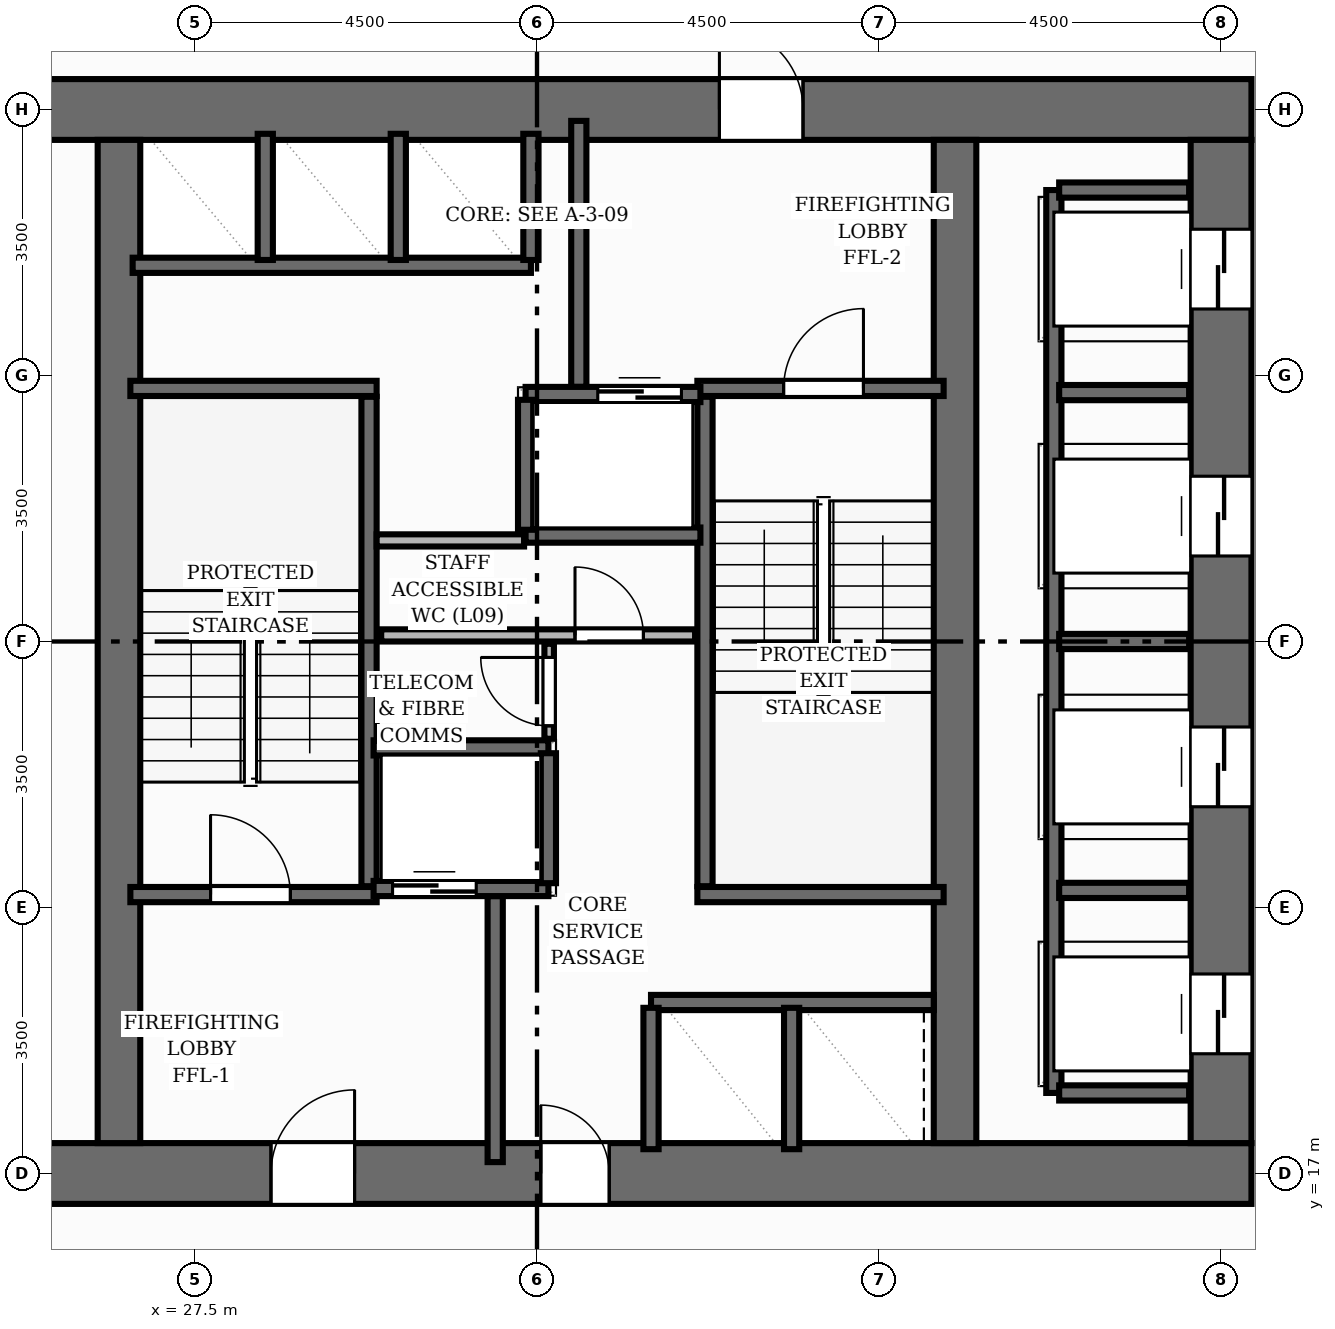
"""IFC4 building model, lengths in metres.
Left out: names, types, materials, properties, quantities, classifications, styles, units other than length and angle.
Written with IfcOpenShell. Run it as: python <this file> out.ifc"""

import sys

from ifc_helpers import new_model, si_unit, direction, frame, frame_2d, origin, place, context, subcontext, project, spatial, rectangle, extrude, element, fill, save


model = new_model("IFC4")
c1 = context("Model", 3, precision=1e-05, world=origin(), true_north=direction((0.0, 1.0)))
c2 = subcontext(c1, "Body", "Model", "MODEL_VIEW")
j1 = project(units=[si_unit("LENGTHUNIT", "METRE"), si_unit("PLANEANGLEUNIT", "RADIAN")], contexts=[c1])
p1 = place(None, origin())
s1 = spatial("IfcSite", under=j1, at=p1, CompositionType="ELEMENT")
p2 = place(p1, origin())
s2 = spatial("IfcBuilding", under=s1, at=p2, CompositionType="ELEMENT")
p3 = place(p2, frame((0.0, 0.0, 34.4)))
s3 = spatial("IfcBuildingStorey", under=s2, at=p3, CompositionType="ELEMENT", Elevation=34.4)
p4 = place(p3, frame((22.6, 17.0, 0.0), z_axis=(0.0, 0.0, 1.0), x_axis=(1.0, 0.0, 0.0)))
e1 = element("IfcWall", 1, at=p4, inside=s3, PredefinedType="SHEAR", context=c2, shape_type="SweptSolid", body=[
    extrude(rectangle(XDim=18.8, YDim=0.8, at=frame_2d((9.4, 0.0))), origin(), (0.0, 0.0, 1.0), 3.2),
])
p5 = place(p4, frame((5.9, 0.0, 0.0)))
e2 = element("IfcOpeningElement", 2, at=p5, cuts=e1, PredefinedType="OPENING", context=c2, shape_type="SweptSolid", body=[
    extrude(rectangle(XDim=1.1, YDim=2.15, at=frame_2d((0.55, 1.075))), frame((0.0, 0.41, 0.0), z_axis=(0.0, -1.0, 0.0), x_axis=(1.0, 0.0, 0.0)), (0.0, 0.0, 1.0), 0.82),
])
p6 = place(p4, frame((9.45, 0.0, 0.0)))
e3 = element("IfcOpeningElement", 3, at=p6, cuts=e1, PredefinedType="OPENING", context=c2, shape_type="SweptSolid", body=[
    extrude(rectangle(XDim=0.9, YDim=2.1, at=frame_2d((0.45, 1.05))), frame((0.0, 0.41, 0.0), z_axis=(0.0, -1.0, 0.0), x_axis=(1.0, 0.0, 0.0)), (0.0, 0.0, 1.0), 0.82),
])
p7 = place(p3, frame((22.6, 31.0, 0.0), z_axis=(0.0, 0.0, 1.0), x_axis=(1.0, 0.0, 0.0)))
e4 = element("IfcWall", 4, at=p7, inside=s3, PredefinedType="SHEAR", context=c2, shape_type="SweptSolid", body=[
    extrude(rectangle(XDim=18.8, YDim=0.8, at=frame_2d((9.4, 0.0))), origin(), (0.0, 0.0, 1.0), 3.2),
])
p8 = place(p7, frame((11.8, 0.0, 0.0)))
e5 = element("IfcOpeningElement", 5, at=p8, cuts=e4, PredefinedType="OPENING", context=c2, shape_type="SweptSolid", body=[
    extrude(rectangle(XDim=1.1, YDim=2.15, at=frame_2d((0.55, 1.075))), frame((0.0, 0.41, 0.0), z_axis=(0.0, -1.0, 0.0), x_axis=(1.0, 0.0, 0.0)), (0.0, 0.0, 1.0), 0.82),
])
p9 = place(p3, frame((41.0, 17.4, 0.0), z_axis=(0.0, 0.0, 1.0), x_axis=(0.0, 1.0, 0.0)))
e6 = element("IfcWall", 6, at=p9, inside=s3, PredefinedType="SHEAR", context=c2, shape_type="SweptSolid", body=[
    extrude(rectangle(XDim=13.2, YDim=0.8, at=frame_2d((6.6, 0.0))), origin(), (0.0, 0.0, 1.0), 3.2),
])
p10 = place(p9, frame((1.175, 0.0, 0.0)))
e7 = element("IfcOpeningElement", 7, at=p10, cuts=e6, PredefinedType="OPENING", context=c2, shape_type="SweptSolid", body=[
    extrude(rectangle(XDim=1.05, YDim=2.15, at=frame_2d((0.525, 1.075))), frame((0.0, 0.41, 0.0), z_axis=(0.0, -1.0, 0.0), x_axis=(1.0, 0.0, 0.0)), (0.0, 0.0, 1.0), 0.82),
])
p11 = place(p9, frame((4.425, 0.0, 0.0)))
e8 = element("IfcOpeningElement", 8, at=p11, cuts=e6, PredefinedType="OPENING", context=c2, shape_type="SweptSolid", body=[
    extrude(rectangle(XDim=1.05, YDim=2.15, at=frame_2d((0.525, 1.075))), frame((0.0, 0.41, 0.0), z_axis=(0.0, -1.0, 0.0), x_axis=(1.0, 0.0, 0.0)), (0.0, 0.0, 1.0), 0.82),
])
p12 = place(p9, frame((7.725, 0.0, 0.0)))
e9 = element("IfcOpeningElement", 9, at=p12, cuts=e6, PredefinedType="OPENING", context=c2, shape_type="SweptSolid", body=[
    extrude(rectangle(XDim=1.05, YDim=2.15, at=frame_2d((0.525, 1.075))), frame((0.0, 0.41, 0.0), z_axis=(0.0, -1.0, 0.0), x_axis=(1.0, 0.0, 0.0)), (0.0, 0.0, 1.0), 0.82),
])
p13 = place(p9, frame((10.975, 0.0, 0.0)))
e10 = element("IfcOpeningElement", 10, at=p13, cuts=e6, PredefinedType="OPENING", context=c2, shape_type="SweptSolid", body=[
    extrude(rectangle(XDim=1.05, YDim=2.15, at=frame_2d((0.525, 1.075))), frame((0.0, 0.41, 0.0), z_axis=(0.0, -1.0, 0.0), x_axis=(1.0, 0.0, 0.0)), (0.0, 0.0, 1.0), 0.82),
])
for number, where, z_axis, x_axis in (
    (11, (26.5, 17.4, 0.0), (0.0, 0.0, 1.0), (0.0, 1.0, 0.0)),
    (12, (37.5, 17.4, 0.0), (0.0, 0.0, 1.0), (0.0, 1.0, 0.0)),
):
    element("IfcWall", number, at=place(p3, frame(where, z_axis=z_axis, x_axis=x_axis)), inside=s3, PredefinedType="SHEAR", context=c2, shape_type="SweptSolid", body=[
        extrude(rectangle(XDim=13.2, YDim=0.56, at=frame_2d((6.6, 0.0))), origin(), (0.0, 0.0, 1.0), 3.2),
    ])
p14 = place(p3, frame((29.79, 20.78, 0.0), z_axis=(0.0, 0.0, 1.0), x_axis=(0.0, 1.0, 0.0)))
e13 = element("IfcWall", 13, at=p14, inside=s3, PredefinedType="SHEAR", context=c2, shape_type="SweptSolid", body=[
    extrude(rectangle(XDim=6.44, YDim=0.2, at=frame_2d((3.22, 0.0))), origin(), (0.0, 0.0, 1.0), 3.2),
])
p15 = place(p3, frame((26.65, 27.33, 0.0), z_axis=(0.0, 0.0, 1.0), x_axis=(1.0, 0.0, 0.0)))
e14 = element("IfcWall", 14, at=p15, inside=s3, PredefinedType="SHEAR", context=c2, shape_type="SweptSolid", body=[
    extrude(rectangle(XDim=3.24, YDim=0.2, at=frame_2d((1.62, 0.0))), origin(), (0.0, 0.0, 1.0), 3.2),
])
p16 = place(p3, frame((26.65, 20.67, 0.0), z_axis=(0.0, 0.0, 1.0), x_axis=(1.0, 0.0, 0.0)))
e15 = element("IfcWall", 15, at=p16, inside=s3, PredefinedType="SHEAR", context=c2, shape_type="SweptSolid", body=[
    extrude(rectangle(XDim=3.24, YDim=0.2, at=frame_2d((1.62, 0.0))), origin(), (0.0, 0.0, 1.0), 3.2),
])
p17 = place(p16, frame((1.055, 0.0, 0.0)))
e16 = element("IfcOpeningElement", 16, at=p17, cuts=e15, PredefinedType="OPENING", context=c2, shape_type="SweptSolid", body=[
    extrude(rectangle(XDim=1.05, YDim=2.15, at=frame_2d((0.525, 1.075))), frame((0.0, 0.11, 0.0), z_axis=(0.0, -1.0, 0.0), x_axis=(1.0, 0.0, 0.0)), (0.0, 0.0, 1.0), 0.22),
])
p18 = place(p3, frame((34.21, 20.78, 0.0), z_axis=(0.0, 0.0, 1.0), x_axis=(0.0, 1.0, 0.0)))
e17 = element("IfcWall", 17, at=p18, inside=s3, PredefinedType="SHEAR", context=c2, shape_type="SweptSolid", body=[
    extrude(rectangle(XDim=6.44, YDim=0.2, at=frame_2d((3.22, 0.0))), origin(), (0.0, 0.0, 1.0), 3.2),
])
p19 = place(p3, frame((34.11, 20.67, 0.0), z_axis=(0.0, 0.0, 1.0), x_axis=(1.0, 0.0, 0.0)))
e18 = element("IfcWall", 18, at=p19, inside=s3, PredefinedType="SHEAR", context=c2, shape_type="SweptSolid", body=[
    extrude(rectangle(XDim=3.24, YDim=0.2, at=frame_2d((1.62, 0.0))), origin(), (0.0, 0.0, 1.0), 3.2),
])
p20 = place(p3, frame((34.11, 27.33, 0.0), z_axis=(0.0, 0.0, 1.0), x_axis=(1.0, 0.0, 0.0)))
e19 = element("IfcWall", 19, at=p20, inside=s3, PredefinedType="SHEAR", context=c2, shape_type="SweptSolid", body=[
    extrude(rectangle(XDim=3.24, YDim=0.2, at=frame_2d((1.62, 0.0))), origin(), (0.0, 0.0, 1.0), 3.2),
])
p21 = place(p20, frame((1.135, 0.0, 0.0)))
e20 = element("IfcOpeningElement", 20, at=p21, cuts=e19, PredefinedType="OPENING", context=c2, shape_type="SweptSolid", body=[
    extrude(rectangle(XDim=1.05, YDim=2.15, at=frame_2d((0.525, 1.075))), frame((0.0, 0.11, 0.0), z_axis=(0.0, -1.0, 0.0), x_axis=(1.0, 0.0, 0.0)), (0.0, 0.0, 1.0), 0.22),
])
for number, where, z_axis, x_axis in (
    (21, (31.45, 17.15, 0.0), (0.0, 0.0, 1.0), (0.0, 1.0, 0.0)),
    (22, (32.55, 27.35, 0.0), (0.0, 0.0, 1.0), (0.0, 1.0, 0.0)),
):
    element("IfcWall", number, at=place(p3, frame(where, z_axis=z_axis, x_axis=x_axis)), inside=s3, PredefinedType="SHEAR", context=c2, shape_type="SweptSolid", body=[
        extrude(rectangle(XDim=3.5, YDim=0.2, at=frame_2d((1.75, 0.0))), origin(), (0.0, 0.0, 1.0), 3.2),
    ])
p22 = place(p3, frame((29.85, 20.75, 0.0), z_axis=(0.0, 0.0, 1.0), x_axis=(1.0, 0.0, 0.0)))
e23 = element("IfcWall", 23, at=p22, inside=s3, PredefinedType="SHEAR", context=c2, shape_type="SweptSolid", body=[
    extrude(rectangle(XDim=2.3, YDim=0.2, at=frame_2d((1.15, 0.0))), origin(), (0.0, 0.0, 1.0), 3.2),
])
p23 = place(p22, frame((0.25, 0.0, 0.0)))
e24 = element("IfcOpeningElement", 24, at=p23, cuts=e23, PredefinedType="OPENING", context=c2, shape_type="SweptSolid", body=[
    extrude(rectangle(XDim=1.1, YDim=2.15, at=frame_2d((0.55, 1.075))), frame((0.0, 0.11, 0.0), z_axis=(0.0, -1.0, 0.0), x_axis=(1.0, 0.0, 0.0)), (0.0, 0.0, 1.0), 0.22),
])
p24 = place(p3, frame((29.85, 22.6, 0.0), z_axis=(0.0, 0.0, 1.0), x_axis=(1.0, 0.0, 0.0)))
e25 = element("IfcWall", 25, at=p24, inside=s3, PredefinedType="SHEAR", context=c2, shape_type="SweptSolid", body=[
    extrude(rectangle(XDim=2.3, YDim=0.2, at=frame_2d((1.15, 0.0))), origin(), (0.0, 0.0, 1.0), 3.2),
])
p25 = place(p3, frame((32.15, 20.82, 0.0), z_axis=(0.0, 0.0, 1.0), x_axis=(0.0, 1.0, 0.0)))
e26 = element("IfcWall", 26, at=p25, inside=s3, PredefinedType="SHEAR", context=c2, shape_type="SweptSolid", body=[
    extrude(rectangle(XDim=1.71, YDim=0.2, at=frame_2d((0.855, 0.0))), origin(), (0.0, 0.0, 1.0), 3.2),
])
p26 = place(p3, frame((31.85, 27.25, 0.0), z_axis=(0.0, 0.0, 1.0), x_axis=(1.0, 0.0, 0.0)))
e27 = element("IfcWall", 27, at=p26, inside=s3, PredefinedType="SHEAR", context=c2, shape_type="SweptSolid", body=[
    extrude(rectangle(XDim=2.3, YDim=0.2, at=frame_2d((1.15, 0.0))), origin(), (0.0, 0.0, 1.0), 3.2),
])
p27 = place(p26, frame((0.95, 0.0, 0.0)))
e28 = element("IfcOpeningElement", 28, at=p27, cuts=e27, PredefinedType="OPENING", context=c2, shape_type="SweptSolid", body=[
    extrude(rectangle(XDim=1.1, YDim=2.15, at=frame_2d((0.55, 1.075))), frame((0.0, 0.11, 0.0), z_axis=(0.0, -1.0, 0.0), x_axis=(1.0, 0.0, 0.0)), (0.0, 0.0, 1.0), 0.22),
])
p28 = place(p3, frame((31.85, 25.4, 0.0), z_axis=(0.0, 0.0, 1.0), x_axis=(1.0, 0.0, 0.0)))
e29 = element("IfcWall", 29, at=p28, inside=s3, PredefinedType="SHEAR", context=c2, shape_type="SweptSolid", body=[
    extrude(rectangle(XDim=2.3, YDim=0.2, at=frame_2d((1.15, 0.0))), origin(), (0.0, 0.0, 1.0), 3.2),
])
p29 = place(p3, frame((31.85, 25.47, 0.0), z_axis=(0.0, 0.0, 1.0), x_axis=(0.0, 1.0, 0.0)))
e30 = element("IfcWall", 30, at=p29, inside=s3, PredefinedType="SHEAR", context=c2, shape_type="SweptSolid", body=[
    extrude(rectangle(XDim=1.71, YDim=0.2, at=frame_2d((0.855, 0.0))), origin(), (0.0, 0.0, 1.0), 3.2),
])
p30 = place(p3, frame((38.8, 18.06, 0.0), z_axis=(0.0, 0.0, 1.0), x_axis=(0.0, 1.0, 0.0)))
e31 = element("IfcWall", 31, at=p30, inside=s3, PredefinedType="SHEAR", context=c2, shape_type="SweptSolid", body=[
    extrude(rectangle(XDim=11.88, YDim=0.2, at=frame_2d((5.94, 0.0))), origin(), (0.0, 0.0, 1.0), 3.2),
])
for number, where, z_axis, x_axis in (
    (32, (38.87, 18.06, 0.0), (0.0, 0.0, 1.0), (1.0, 0.0, 0.0)),
    (33, (38.87, 29.94, 0.0), (0.0, 0.0, 1.0), (1.0, 0.0, 0.0)),
    (34, (38.87, 20.725, 0.0), (0.0, 0.0, 1.0), (1.0, 0.0, 0.0)),
    (35, (38.87, 24.0, 0.0), (0.0, 0.0, 1.0), (1.0, 0.0, 0.0)),
    (36, (38.87, 27.275, 0.0), (0.0, 0.0, 1.0), (1.0, 0.0, 0.0)),
):
    element("IfcWall", number, at=place(p3, frame(where, z_axis=z_axis, x_axis=x_axis)), inside=s3, PredefinedType="SHEAR", context=c2, shape_type="SweptSolid", body=[
        extrude(rectangle(XDim=1.71, YDim=0.2, at=frame_2d((0.855, 0.0))), origin(), (0.0, 0.0, 1.0), 3.2),
    ])
p31 = place(p3, frame((26.68, 28.95, 0.0), z_axis=(0.0, 0.0, 1.0), x_axis=(1.0, 0.0, 0.0)))
e37 = element("IfcWall", 37, at=p31, inside=s3, PredefinedType="SHEAR", context=c2, shape_type="SweptSolid", body=[
    extrude(rectangle(XDim=5.24, YDim=0.2, at=frame_2d((2.62, 0.0))), origin(), (0.0, 0.0, 1.0), 3.2),
])
for number, where, z_axis, x_axis in (
    (38, (31.92, 29.02, 0.0), (0.0, 0.0, 1.0), (0.0, 1.0, 0.0)),
    (39, (28.425, 29.02, 0.0), (0.0, 0.0, 1.0), (0.0, 1.0, 0.0)),
    (40, (30.175, 29.02, 0.0), (0.0, 0.0, 1.0), (0.0, 1.0, 0.0)),
):
    element("IfcWall", number, at=place(p3, frame(where, z_axis=z_axis, x_axis=x_axis)), inside=s3, PredefinedType="SHEAR", context=c2, shape_type="SweptSolid", body=[
        extrude(rectangle(XDim=1.66, YDim=0.2, at=frame_2d((0.83, 0.0))), origin(), (0.0, 0.0, 1.0), 3.2),
    ])
p32 = place(p3, frame((33.5, 19.25, 0.0), z_axis=(0.0, 0.0, 1.0), x_axis=(1.0, 0.0, 0.0)))
e41 = element("IfcWall", 41, at=p32, inside=s3, PredefinedType="SHEAR", context=c2, shape_type="SweptSolid", body=[
    extrude(rectangle(XDim=3.72, YDim=0.2, at=frame_2d((1.86, 0.0))), origin(), (0.0, 0.0, 1.0), 3.2),
])
for number, where, z_axis, x_axis in (
    (42, (33.5, 17.32, 0.0), (0.0, 0.0, 1.0), (0.0, 1.0, 0.0)),
    (43, (35.35, 17.32, 0.0), (0.0, 0.0, 1.0), (0.0, 1.0, 0.0)),
):
    element("IfcWall", number, at=place(p3, frame(where, z_axis=z_axis, x_axis=x_axis)), inside=s3, PredefinedType="SHEAR", context=c2, shape_type="SweptSolid", body=[
        extrude(rectangle(XDim=1.86, YDim=0.2, at=frame_2d((0.93, 0.0))), origin(), (0.0, 0.0, 1.0), 3.2),
    ])
p33 = place(p3, frame((29.95, 24.08, 0.0), z_axis=(0.0, 0.0, 1.0), x_axis=(1.0, 0.0, 0.0)))
e44 = element("IfcWall", 44, at=p33, inside=s3, PredefinedType="PLUMBINGWALL", context=c2, shape_type="SweptSolid", body=[
    extrude(rectangle(XDim=4.13, YDim=0.16, at=frame_2d((2.065, 0.0))), origin(), (0.0, 0.0, 1.0), 2.955),
])
p34 = place(p33, frame((2.55, 0.0, 0.0)))
e45 = element("IfcOpeningElement", 45, at=p34, cuts=e44, PredefinedType="OPENING", context=c2, shape_type="SweptSolid", body=[
    extrude(rectangle(XDim=0.9, YDim=2.1, at=frame_2d((0.45, 1.05))), frame((0.0, 0.09, 0.0), z_axis=(0.0, -1.0, 0.0), x_axis=(1.0, 0.0, 0.0)), (0.0, 0.0, 1.0), 0.18),
])
p35 = place(p3, frame((32.16, 22.72, 0.0), z_axis=(0.0, 0.0, 1.0), x_axis=(0.0, 1.0, 0.0)))
e46 = element("IfcWall", 46, at=p35, inside=s3, PredefinedType="PARTITIONING", context=c2, shape_type="SweptSolid", body=[
    extrude(rectangle(XDim=1.25, YDim=0.125, at=frame_2d((0.625, 0.0))), origin(), (0.0, 0.0, 1.0), 2.955),
])
p36 = place(p35, frame((0.17, 0.0, 0.0)))
e47 = element("IfcOpeningElement", 47, at=p36, cuts=e46, PredefinedType="OPENING", context=c2, shape_type="SweptSolid", body=[
    extrude(rectangle(XDim=0.9, YDim=2.1, at=frame_2d((0.45, 1.05))), frame((0.0, 0.073, 0.0), z_axis=(0.0, -1.0, 0.0), x_axis=(1.0, 0.0, 0.0)), (0.0, 0.0, 1.0), 0.145),
])
p37 = place(p3, frame((29.89, 25.33, 0.0), z_axis=(0.0, 0.0, 1.0), x_axis=(1.0, 0.0, 0.0)))
e48 = element("IfcWall", 48, at=p37, inside=s3, PredefinedType="PLUMBINGWALL", context=c2, shape_type="SweptSolid", body=[
    extrude(rectangle(XDim=1.94, YDim=0.16, at=frame_2d((0.97, 0.0))), origin(), (0.0, 0.0, 1.0), 2.955),
])
p38 = place(p17, origin())
e49 = element("IfcDoor", 49, at=p38, inside=s3, OperationType="SINGLE_SWING_LEFT", PredefinedType="DOOR", context=c2, shape_type="SweptSolid", body=[
    extrude(rectangle(XDim=1.05, YDim=2.15, at=frame_2d((0.525, 1.075))), frame((0.0, 0.025, 0.0), z_axis=(0.0, -1.0, 0.0), x_axis=(1.0, 0.0, 0.0)), (0.0, 0.0, 1.0), 0.05),
])
fill(e16, e49)
p39 = place(p21, origin())
e50 = element("IfcDoor", 50, at=p39, inside=s3, OperationType="SINGLE_SWING_RIGHT", PredefinedType="DOOR", context=c2, shape_type="SweptSolid", body=[
    extrude(rectangle(XDim=1.05, YDim=2.15, at=frame_2d((0.525, 1.075))), frame((0.0, 0.025, 0.0), z_axis=(0.0, -1.0, 0.0), x_axis=(1.0, 0.0, 0.0)), (0.0, 0.0, 1.0), 0.05),
])
fill(e20, e50)
p40 = place(p5, origin())
e51 = element("IfcDoor", 51, at=p40, inside=s3, OperationType="SINGLE_SWING_RIGHT", PredefinedType="DOOR", context=c2, shape_type="SweptSolid", body=[
    extrude(rectangle(XDim=1.1, YDim=2.15, at=frame_2d((0.55, 1.075))), frame((0.0, 0.025, 0.0), z_axis=(0.0, -1.0, 0.0), x_axis=(1.0, 0.0, 0.0)), (0.0, 0.0, 1.0), 0.05),
])
fill(e2, e51)
p41 = place(p8, origin())
e52 = element("IfcDoor", 52, at=p41, inside=s3, OperationType="SINGLE_SWING_LEFT", PredefinedType="DOOR", context=c2, shape_type="SweptSolid", body=[
    extrude(rectangle(XDim=1.1, YDim=2.15, at=frame_2d((0.55, 1.075))), frame((0.0, 0.025, 0.0), z_axis=(0.0, -1.0, 0.0), x_axis=(1.0, 0.0, 0.0)), (0.0, 0.0, 1.0), 0.05),
])
fill(e5, e52)
p42 = place(p23, origin())
e53 = element("IfcDoor", 53, at=p42, inside=s3, OperationType="DOUBLE_DOOR_SLIDING", PredefinedType="DOOR", context=c2, shape_type="SweptSolid", body=[
    extrude(rectangle(XDim=1.1, YDim=2.15, at=frame_2d((0.55, 1.075))), frame((0.0, 0.025, 0.0), z_axis=(0.0, -1.0, 0.0), x_axis=(1.0, 0.0, 0.0)), (0.0, 0.0, 1.0), 0.05),
])
fill(e24, e53)
p43 = place(p27, origin())
e54 = element("IfcDoor", 54, at=p43, inside=s3, OperationType="DOUBLE_DOOR_SLIDING", PredefinedType="DOOR", context=c2, shape_type="SweptSolid", body=[
    extrude(rectangle(XDim=1.1, YDim=2.15, at=frame_2d((0.55, 1.075))), frame((0.0, 0.025, 0.0), z_axis=(0.0, -1.0, 0.0), x_axis=(1.0, 0.0, 0.0)), (0.0, 0.0, 1.0), 0.05),
])
fill(e28, e54)
p44 = place(p10, origin())
e55 = element("IfcDoor", 55, at=p44, inside=s3, OperationType="DOUBLE_DOOR_SLIDING", PredefinedType="DOOR", context=c2, shape_type="SweptSolid", body=[
    extrude(rectangle(XDim=1.05, YDim=2.15, at=frame_2d((0.525, 1.075))), frame((0.0, 0.025, 0.0), z_axis=(0.0, -1.0, 0.0), x_axis=(1.0, 0.0, 0.0)), (0.0, 0.0, 1.0), 0.05),
])
fill(e7, e55)
p45 = place(p11, origin())
e56 = element("IfcDoor", 56, at=p45, inside=s3, OperationType="DOUBLE_DOOR_SLIDING", PredefinedType="DOOR", context=c2, shape_type="SweptSolid", body=[
    extrude(rectangle(XDim=1.05, YDim=2.15, at=frame_2d((0.525, 1.075))), frame((0.0, 0.025, 0.0), z_axis=(0.0, -1.0, 0.0), x_axis=(1.0, 0.0, 0.0)), (0.0, 0.0, 1.0), 0.05),
])
fill(e8, e56)
p46 = place(p12, origin())
e57 = element("IfcDoor", 57, at=p46, inside=s3, OperationType="DOUBLE_DOOR_SLIDING", PredefinedType="DOOR", context=c2, shape_type="SweptSolid", body=[
    extrude(rectangle(XDim=1.05, YDim=2.15, at=frame_2d((0.525, 1.075))), frame((0.0, 0.025, 0.0), z_axis=(0.0, -1.0, 0.0), x_axis=(1.0, 0.0, 0.0)), (0.0, 0.0, 1.0), 0.05),
])
fill(e9, e57)
p47 = place(p13, origin())
e58 = element("IfcDoor", 58, at=p47, inside=s3, OperationType="DOUBLE_DOOR_SLIDING", PredefinedType="DOOR", context=c2, shape_type="SweptSolid", body=[
    extrude(rectangle(XDim=1.05, YDim=2.15, at=frame_2d((0.525, 1.075))), frame((0.0, 0.025, 0.0), z_axis=(0.0, -1.0, 0.0), x_axis=(1.0, 0.0, 0.0)), (0.0, 0.0, 1.0), 0.05),
])
fill(e10, e58)
p48 = place(p6, origin())
e59 = element("IfcDoor", 59, at=p48, inside=s3, OperationType="SINGLE_SWING_LEFT", PredefinedType="DOOR", context=c2, shape_type="SweptSolid", body=[
    extrude(rectangle(XDim=0.9, YDim=2.1, at=frame_2d((0.45, 1.05))), frame((0.0, 0.025, 0.0), z_axis=(0.0, -1.0, 0.0), x_axis=(1.0, 0.0, 0.0)), (0.0, 0.0, 1.0), 0.05),
])
fill(e3, e59)
p49 = place(p34, origin())
e60 = element("IfcDoor", 60, at=p49, inside=s3, OperationType="SINGLE_SWING_LEFT", PredefinedType="DOOR", context=c2, shape_type="SweptSolid", body=[
    extrude(rectangle(XDim=0.9, YDim=2.1, at=frame_2d((0.45, 1.05))), frame((0.0, 0.025, 0.0), z_axis=(0.0, -1.0, 0.0), x_axis=(1.0, 0.0, 0.0)), (0.0, 0.0, 1.0), 0.05),
])
fill(e45, e60)
p50 = place(p36, origin())
e61 = element("IfcDoor", 61, at=p50, inside=s3, OperationType="SINGLE_SWING_RIGHT", PredefinedType="DOOR", context=c2, shape_type="SweptSolid", body=[
    extrude(rectangle(XDim=0.9, YDim=2.1, at=frame_2d((0.45, 1.05))), frame((0.0, 0.025, 0.0), z_axis=(0.0, -1.0, 0.0), x_axis=(1.0, 0.0, 0.0)), (0.0, 0.0, 1.0), 0.05),
])
fill(e47, e61)
save(model, sys.argv[1])
